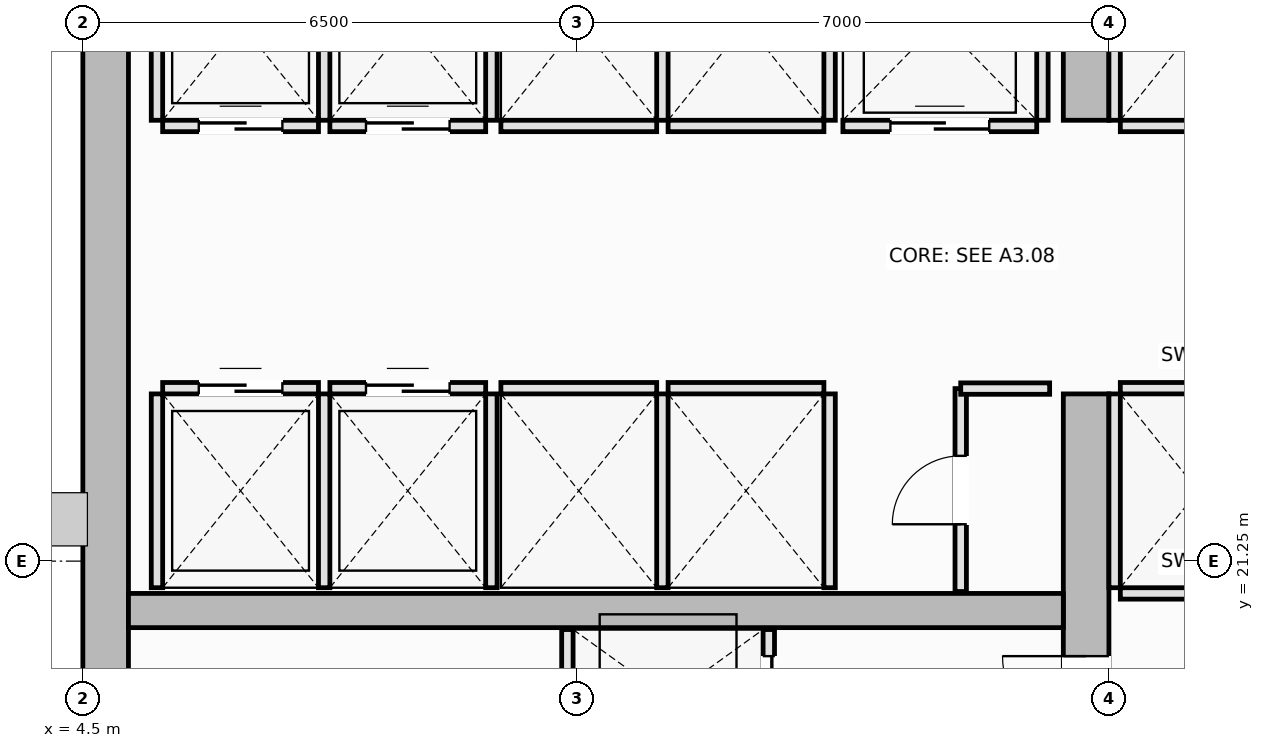
"""IFC4 building model, lengths in metres.
Left out: names, types, materials, properties, quantities, classifications, styles, units other than length and angle.
Written with IfcOpenShell. Run it as: python <this file> out.ifc"""

import sys

from ifc_helpers import new_model, si_unit, direction, frame, frame_2d, origin, place, context, subcontext, project, spatial, rectangle, extrude, element, fill, save


model = new_model("IFC4")
c1 = context("Model", 3, precision=1e-05, world=origin(), true_north=direction((0.0, 1.0)))
c2 = subcontext(c1, "Body", "Model", "MODEL_VIEW")
j1 = project(units=[si_unit("LENGTHUNIT", "METRE"), si_unit("PLANEANGLEUNIT", "RADIAN")], contexts=[c1])
p1 = place(None, origin())
s1 = spatial("IfcSite", under=j1, at=p1, CompositionType="ELEMENT")
p2 = place(p1, origin())
s2 = spatial("IfcBuilding", under=s1, at=p2, CompositionType="ELEMENT")
p3 = place(p2, frame((0.0, 0.0, 102.25)))
s3 = spatial("IfcBuildingStorey", under=s2, at=p3, CompositionType="ELEMENT", Elevation=102.25)
p4 = place(p3, frame((4.8, 14.6, 0.0), z_axis=(0.0, 0.0, 1.0), x_axis=(0.0, 1.0, 0.0)))
e1 = element("IfcWall", 1, at=p4, inside=s3, PredefinedType="SHEAR", context=c2, shape_type="SweptSolid", body=[
    extrude(rectangle(XDim=21.3, YDim=0.6, at=frame_2d((10.65, 0.0))), origin(), (0.0, 0.0, 1.0), 3.55),
])
p5 = place(p3, frame((17.7, 14.6, 0.0), z_axis=(0.0, 0.0, 1.0), x_axis=(0.0, 1.0, 0.0)))
e2 = element("IfcWall", 2, at=p5, inside=s3, PredefinedType="SHEAR", context=c2, shape_type="SweptSolid", body=[
    extrude(rectangle(XDim=8.85, YDim=0.6, at=frame_2d((4.425, 0.0))), origin(), (0.0, 0.0, 1.0), 3.55),
])
p6 = place(p5, frame((4.3, 0.0, 0.0)))
e3 = element("IfcOpeningElement", 3, at=p6, cuts=e2, PredefinedType="OPENING", context=c2, shape_type="SweptSolid", body=[
    extrude(rectangle(XDim=1.1, YDim=2.15, at=frame_2d((0.55, 1.075))), frame((0.0, 0.31, 0.0), z_axis=(0.0, -1.0, 0.0), x_axis=(1.0, 0.0, 0.0)), (0.0, 0.0, 1.0), 0.62),
])
p7 = place(p3, frame((17.7, 27.05, 0.0), z_axis=(0.0, 0.0, 1.0), x_axis=(0.0, 1.0, 0.0)))
e4 = element("IfcWall", 4, at=p7, inside=s3, PredefinedType="SHEAR", context=c2, shape_type="SweptSolid", body=[
    extrude(rectangle(XDim=8.85, YDim=0.6, at=frame_2d((4.425, 0.0))), origin(), (0.0, 0.0, 1.0), 3.55),
])
p8 = place(p7, frame((3.45, 0.0, 0.0)))
e5 = element("IfcOpeningElement", 5, at=p8, cuts=e4, PredefinedType="OPENING", context=c2, shape_type="SweptSolid", body=[
    extrude(rectangle(XDim=1.1, YDim=2.15, at=frame_2d((0.55, 1.075))), frame((0.0, 0.31, 0.0), z_axis=(0.0, -1.0, 0.0), x_axis=(1.0, 0.0, 0.0)), (0.0, 0.0, 1.0), 0.62),
])
p9 = place(p3, frame((5.1, 20.6, 0.0), z_axis=(0.0, 0.0, 1.0), x_axis=(1.0, 0.0, 0.0)))
e6 = element("IfcWall", 6, at=p9, inside=s3, PredefinedType="SHEAR", context=c2, shape_type="SweptSolid", body=[
    extrude(rectangle(XDim=12.3, YDim=0.45, at=frame_2d((6.15, 0.0))), origin(), (0.0, 0.0, 1.0), 3.55),
])
for number, where, z_axis, x_axis in (
    (7, (18.15, 20.825, 0.0), (0.0, 0.0, 1.0), (1.0, 0.0, 0.0)),
    (8, (18.15, 23.525, 0.0), (0.0, 0.0, 1.0), (1.0, 0.0, 0.0)),
):
    element("IfcWall", number, at=place(p3, frame(where, z_axis=z_axis, x_axis=x_axis)), inside=s3, PredefinedType="PARTITIONING", context=c2, shape_type="SweptSolid", body=[
        extrude(rectangle(XDim=2.05, YDim=0.15, at=frame_2d((1.025, 0.0))), origin(), (0.0, 0.0, 1.0), 3.37),
    ])
p10 = place(p3, frame((18.075, 20.9, 0.0), z_axis=(0.0, 0.0, 1.0), x_axis=(0.0, 1.0, 0.0)))
e9 = element("IfcWall", 9, at=p10, inside=s3, PredefinedType="PARTITIONING", context=c2, shape_type="SweptSolid", body=[
    extrude(rectangle(XDim=2.55, YDim=0.15, at=frame_2d((1.275, 0.0))), origin(), (0.0, 0.0, 1.0), 3.37),
])
p11 = place(p3, frame((18.15, 26.975, 0.0), z_axis=(0.0, 0.0, 1.0), x_axis=(1.0, 0.0, 0.0)))
e10 = element("IfcWall", 10, at=p11, inside=s3, PredefinedType="PARTITIONING", context=c2, shape_type="SweptSolid", body=[
    extrude(rectangle(XDim=2.05, YDim=0.15, at=frame_2d((1.025, 0.0))), origin(), (0.0, 0.0, 1.0), 3.37),
])
p12 = place(p3, frame((18.075, 27.05, 0.0), z_axis=(0.0, 0.0, 1.0), x_axis=(0.0, 1.0, 0.0)))
e11 = element("IfcWall", 11, at=p12, inside=s3, PredefinedType="PARTITIONING", context=c2, shape_type="SweptSolid", body=[
    extrude(rectangle(XDim=2.55, YDim=0.15, at=frame_2d((1.275, 0.0))), origin(), (0.0, 0.0, 1.0), 3.37),
])
p13 = place(p3, frame((5.55, 23.525, 0.0), z_axis=(0.0, 0.0, 1.0), x_axis=(1.0, 0.0, 0.0)))
e12 = element("IfcWall", 12, at=p13, inside=s3, PredefinedType="PARTITIONING", context=c2, shape_type="SweptSolid", body=[
    extrude(rectangle(XDim=2.05, YDim=0.15, at=frame_2d((1.025, 0.0))), origin(), (0.0, 0.0, 1.0), 3.37),
])
p14 = place(p13, frame((0.475, 0.0, 0.0)))
e13 = element("IfcOpeningElement", 13, at=p14, cuts=e12, PredefinedType="OPENING", context=c2, shape_type="SweptSolid", body=[
    extrude(rectangle(XDim=1.1, YDim=2.2, at=frame_2d((0.55, 1.1))), frame((0.0, 0.085, 0.0), z_axis=(0.0, -1.0, 0.0), x_axis=(1.0, 0.0, 0.0)), (0.0, 0.0, 1.0), 0.17),
])
for number, where, z_axis, x_axis in (
    (14, (5.475, 20.9, 0.0), (0.0, 0.0, 1.0), (0.0, 1.0, 0.0)),
    (15, (7.675, 20.9, 0.0), (0.0, 0.0, 1.0), (0.0, 1.0, 0.0)),
):
    element("IfcWall", number, at=place(p3, frame(where, z_axis=z_axis, x_axis=x_axis)), inside=s3, PredefinedType="PARTITIONING", context=c2, shape_type="SweptSolid", body=[
        extrude(rectangle(XDim=2.55, YDim=0.15, at=frame_2d((1.275, 0.0))), origin(), (0.0, 0.0, 1.0), 3.37),
    ])
p15 = place(p3, frame((7.75, 23.525, 0.0), z_axis=(0.0, 0.0, 1.0), x_axis=(1.0, 0.0, 0.0)))
e16 = element("IfcWall", 16, at=p15, inside=s3, PredefinedType="PARTITIONING", context=c2, shape_type="SweptSolid", body=[
    extrude(rectangle(XDim=2.05, YDim=0.15, at=frame_2d((1.025, 0.0))), origin(), (0.0, 0.0, 1.0), 3.37),
])
p16 = place(p15, frame((0.475, 0.0, 0.0)))
e17 = element("IfcOpeningElement", 17, at=p16, cuts=e16, PredefinedType="OPENING", context=c2, shape_type="SweptSolid", body=[
    extrude(rectangle(XDim=1.1, YDim=2.2, at=frame_2d((0.55, 1.1))), frame((0.0, 0.085, 0.0), z_axis=(0.0, -1.0, 0.0), x_axis=(1.0, 0.0, 0.0)), (0.0, 0.0, 1.0), 0.17),
])
p17 = place(p3, frame((9.875, 20.9, 0.0), z_axis=(0.0, 0.0, 1.0), x_axis=(0.0, 1.0, 0.0)))
e18 = element("IfcWall", 18, at=p17, inside=s3, PredefinedType="PARTITIONING", context=c2, shape_type="SweptSolid", body=[
    extrude(rectangle(XDim=2.55, YDim=0.15, at=frame_2d((1.275, 0.0))), origin(), (0.0, 0.0, 1.0), 3.37),
])
p18 = place(p3, frame((5.55, 26.975, 0.0), z_axis=(0.0, 0.0, 1.0), x_axis=(1.0, 0.0, 0.0)))
e19 = element("IfcWall", 19, at=p18, inside=s3, PredefinedType="PARTITIONING", context=c2, shape_type="SweptSolid", body=[
    extrude(rectangle(XDim=2.05, YDim=0.15, at=frame_2d((1.025, 0.0))), origin(), (0.0, 0.0, 1.0), 3.37),
])
p19 = place(p18, frame((0.475, 0.0, 0.0)))
e20 = element("IfcOpeningElement", 20, at=p19, cuts=e19, PredefinedType="OPENING", context=c2, shape_type="SweptSolid", body=[
    extrude(rectangle(XDim=1.1, YDim=2.2, at=frame_2d((0.55, 1.1))), frame((0.0, 0.085, 0.0), z_axis=(0.0, -1.0, 0.0), x_axis=(1.0, 0.0, 0.0)), (0.0, 0.0, 1.0), 0.17),
])
for number, where, z_axis, x_axis in (
    (21, (5.475, 27.05, 0.0), (0.0, 0.0, 1.0), (0.0, 1.0, 0.0)),
    (22, (7.675, 27.05, 0.0), (0.0, 0.0, 1.0), (0.0, 1.0, 0.0)),
):
    element("IfcWall", number, at=place(p3, frame(where, z_axis=z_axis, x_axis=x_axis)), inside=s3, PredefinedType="PARTITIONING", context=c2, shape_type="SweptSolid", body=[
        extrude(rectangle(XDim=2.55, YDim=0.15, at=frame_2d((1.275, 0.0))), origin(), (0.0, 0.0, 1.0), 3.37),
    ])
p20 = place(p3, frame((7.75, 26.975, 0.0), z_axis=(0.0, 0.0, 1.0), x_axis=(1.0, 0.0, 0.0)))
e23 = element("IfcWall", 23, at=p20, inside=s3, PredefinedType="PARTITIONING", context=c2, shape_type="SweptSolid", body=[
    extrude(rectangle(XDim=2.05, YDim=0.15, at=frame_2d((1.025, 0.0))), origin(), (0.0, 0.0, 1.0), 3.37),
])
p21 = place(p20, frame((0.475, 0.0, 0.0)))
e24 = element("IfcOpeningElement", 24, at=p21, cuts=e23, PredefinedType="OPENING", context=c2, shape_type="SweptSolid", body=[
    extrude(rectangle(XDim=1.1, YDim=2.2, at=frame_2d((0.55, 1.1))), frame((0.0, 0.085, 0.0), z_axis=(0.0, -1.0, 0.0), x_axis=(1.0, 0.0, 0.0)), (0.0, 0.0, 1.0), 0.17),
])
p22 = place(p3, frame((9.875, 27.05, 0.0), z_axis=(0.0, 0.0, 1.0), x_axis=(0.0, 1.0, 0.0)))
e25 = element("IfcWall", 25, at=p22, inside=s3, PredefinedType="PARTITIONING", context=c2, shape_type="SweptSolid", body=[
    extrude(rectangle(XDim=2.55, YDim=0.15, at=frame_2d((1.275, 0.0))), origin(), (0.0, 0.0, 1.0), 3.37),
])
p23 = place(p3, frame((10.0, 23.525, 0.0), z_axis=(0.0, 0.0, 1.0), x_axis=(1.0, 0.0, 0.0)))
e26 = element("IfcWall", 26, at=p23, inside=s3, PredefinedType="PARTITIONING", context=c2, shape_type="SweptSolid", body=[
    extrude(rectangle(XDim=2.05, YDim=0.15, at=frame_2d((1.025, 0.0))), origin(), (0.0, 0.0, 1.0), 3.37),
])
p24 = place(p3, frame((12.125, 20.9, 0.0), z_axis=(0.0, 0.0, 1.0), x_axis=(0.0, 1.0, 0.0)))
e27 = element("IfcWall", 27, at=p24, inside=s3, PredefinedType="PARTITIONING", context=c2, shape_type="SweptSolid", body=[
    extrude(rectangle(XDim=2.55, YDim=0.15, at=frame_2d((1.275, 0.0))), origin(), (0.0, 0.0, 1.0), 3.37),
])
p25 = place(p3, frame((12.2, 23.525, 0.0), z_axis=(0.0, 0.0, 1.0), x_axis=(1.0, 0.0, 0.0)))
e28 = element("IfcWall", 28, at=p25, inside=s3, PredefinedType="PARTITIONING", context=c2, shape_type="SweptSolid", body=[
    extrude(rectangle(XDim=2.05, YDim=0.15, at=frame_2d((1.025, 0.0))), origin(), (0.0, 0.0, 1.0), 3.37),
])
p26 = place(p3, frame((14.325, 20.9, 0.0), z_axis=(0.0, 0.0, 1.0), x_axis=(0.0, 1.0, 0.0)))
e29 = element("IfcWall", 29, at=p26, inside=s3, PredefinedType="PARTITIONING", context=c2, shape_type="SweptSolid", body=[
    extrude(rectangle(XDim=2.55, YDim=0.15, at=frame_2d((1.275, 0.0))), origin(), (0.0, 0.0, 1.0), 3.37),
])
p27 = place(p3, frame((10.0, 26.975, 0.0), z_axis=(0.0, 0.0, 1.0), x_axis=(1.0, 0.0, 0.0)))
e30 = element("IfcWall", 30, at=p27, inside=s3, PredefinedType="PARTITIONING", context=c2, shape_type="SweptSolid", body=[
    extrude(rectangle(XDim=2.05, YDim=0.15, at=frame_2d((1.025, 0.0))), origin(), (0.0, 0.0, 1.0), 3.37),
])
p28 = place(p3, frame((12.125, 27.05, 0.0), z_axis=(0.0, 0.0, 1.0), x_axis=(0.0, 1.0, 0.0)))
e31 = element("IfcWall", 31, at=p28, inside=s3, PredefinedType="PARTITIONING", context=c2, shape_type="SweptSolid", body=[
    extrude(rectangle(XDim=2.55, YDim=0.15, at=frame_2d((1.275, 0.0))), origin(), (0.0, 0.0, 1.0), 3.37),
])
p29 = place(p3, frame((12.2, 26.975, 0.0), z_axis=(0.0, 0.0, 1.0), x_axis=(1.0, 0.0, 0.0)))
e32 = element("IfcWall", 32, at=p29, inside=s3, PredefinedType="PARTITIONING", context=c2, shape_type="SweptSolid", body=[
    extrude(rectangle(XDim=2.05, YDim=0.15, at=frame_2d((1.025, 0.0))), origin(), (0.0, 0.0, 1.0), 3.37),
])
p30 = place(p3, frame((14.325, 27.05, 0.0), z_axis=(0.0, 0.0, 1.0), x_axis=(0.0, 1.0, 0.0)))
e33 = element("IfcWall", 33, at=p30, inside=s3, PredefinedType="PARTITIONING", context=c2, shape_type="SweptSolid", body=[
    extrude(rectangle(XDim=2.55, YDim=0.15, at=frame_2d((1.275, 0.0))), origin(), (0.0, 0.0, 1.0), 3.37),
])
p31 = place(p3, frame((14.5, 26.975, 0.0), z_axis=(0.0, 0.0, 1.0), x_axis=(1.0, 0.0, 0.0)))
e34 = element("IfcWall", 34, at=p31, inside=s3, PredefinedType="PARTITIONING", context=c2, shape_type="SweptSolid", body=[
    extrude(rectangle(XDim=2.55, YDim=0.15, at=frame_2d((1.275, 0.0))), origin(), (0.0, 0.0, 1.0), 3.37),
])
p32 = place(p31, frame((0.625, 0.0, 0.0)))
e35 = element("IfcOpeningElement", 35, at=p32, cuts=e34, PredefinedType="OPENING", context=c2, shape_type="SweptSolid", body=[
    extrude(rectangle(XDim=1.3, YDim=2.2, at=frame_2d((0.65, 1.1))), frame((0.0, 0.085, 0.0), z_axis=(0.0, -1.0, 0.0), x_axis=(1.0, 0.0, 0.0)), (0.0, 0.0, 1.0), 0.17),
])
p33 = place(p3, frame((17.125, 27.05, 0.0), z_axis=(0.0, 0.0, 1.0), x_axis=(0.0, 1.0, 0.0)))
e36 = element("IfcWall", 36, at=p33, inside=s3, PredefinedType="PARTITIONING", context=c2, shape_type="SweptSolid", body=[
    extrude(rectangle(XDim=2.6, YDim=0.15, at=frame_2d((1.3, 0.0))), origin(), (0.0, 0.0, 1.0), 3.37),
])
p34 = place(p3, frame((10.875, 18.55, 0.0), z_axis=(0.0, 0.0, 1.0), x_axis=(0.0, 1.0, 0.0)))
e37 = element("IfcWall", 37, at=p34, inside=s3, PredefinedType="PARTITIONING", context=c2, shape_type="SweptSolid", body=[
    extrude(rectangle(XDim=1.8, YDim=0.15, at=frame_2d((0.9, 0.0))), origin(), (0.0, 0.0, 1.0), 3.37),
])
p35 = place(p3, frame((13.525, 18.55, 0.0), z_axis=(0.0, 0.0, 1.0), x_axis=(0.0, 1.0, 0.0)))
e38 = element("IfcWall", 38, at=p35, inside=s3, PredefinedType="PARTITIONING", context=c2, shape_type="SweptSolid", body=[
    extrude(rectangle(XDim=1.8, YDim=0.15, at=frame_2d((0.9, 0.0))), origin(), (0.0, 0.0, 1.0), 3.37),
])
p36 = place(p35, frame((0.35, 0.0, 0.0)))
e39 = element("IfcOpeningElement", 39, at=p36, cuts=e38, PredefinedType="OPENING", context=c2, shape_type="SweptSolid", body=[
    extrude(rectangle(XDim=1.1, YDim=2.2, at=frame_2d((0.55, 1.1))), frame((0.0, 0.085, 0.0), z_axis=(0.0, -1.0, 0.0), x_axis=(1.0, 0.0, 0.0)), (0.0, 0.0, 1.0), 0.17),
])
p37 = place(p3, frame((16.05, 20.85, 0.0), z_axis=(0.0, 0.0, 1.0), x_axis=(0.0, 1.0, 0.0)))
e40 = element("IfcWall", 40, at=p37, inside=s3, PredefinedType="PARTITIONING", context=c2, shape_type="SweptSolid", body=[
    extrude(rectangle(XDim=2.67, YDim=0.15, at=frame_2d((1.335, 0.0))), origin(), (0.0, 0.0, 1.0), 3.37),
])
p38 = place(p37, frame((0.885, 0.0, 0.0)))
e41 = element("IfcOpeningElement", 41, at=p38, cuts=e40, PredefinedType="OPENING", context=c2, shape_type="SweptSolid", body=[
    extrude(rectangle(XDim=0.9, YDim=2.1, at=frame_2d((0.45, 1.05))), frame((0.0, 0.085, 0.0), z_axis=(0.0, -1.0, 0.0), x_axis=(1.0, 0.0, 0.0)), (0.0, 0.0, 1.0), 0.17),
])
p39 = place(p3, frame((16.05, 23.52, 0.0), z_axis=(0.0, 0.0, 1.0), x_axis=(1.0, 0.0, 0.0)))
e42 = element("IfcWall", 42, at=p39, inside=s3, PredefinedType="PARTITIONING", context=c2, shape_type="SweptSolid", body=[
    extrude(rectangle(XDim=1.17, YDim=0.15, at=frame_2d((0.585, 0.0))), origin(), (0.0, 0.0, 1.0), 3.37),
])
p40 = place(p14, origin())
e43 = element("IfcDoor", 43, at=p40, inside=s3, OperationType="DOUBLE_DOOR_SLIDING", PredefinedType="DOOR", context=c2, shape_type="SweptSolid", body=[
    extrude(rectangle(XDim=1.1, YDim=2.2, at=frame_2d((0.55, 1.1))), frame((0.0, 0.025, 0.0), z_axis=(0.0, -1.0, 0.0), x_axis=(1.0, 0.0, 0.0)), (0.0, 0.0, 1.0), 0.05),
])
fill(e13, e43)
p41 = place(p16, origin())
e44 = element("IfcDoor", 44, at=p41, inside=s3, OperationType="DOUBLE_DOOR_SLIDING", PredefinedType="DOOR", context=c2, shape_type="SweptSolid", body=[
    extrude(rectangle(XDim=1.1, YDim=2.2, at=frame_2d((0.55, 1.1))), frame((0.0, 0.025, 0.0), z_axis=(0.0, -1.0, 0.0), x_axis=(1.0, 0.0, 0.0)), (0.0, 0.0, 1.0), 0.05),
])
fill(e17, e44)
p42 = place(p19, origin())
e45 = element("IfcDoor", 45, at=p42, inside=s3, OperationType="DOUBLE_DOOR_SLIDING", PredefinedType="DOOR", context=c2, shape_type="SweptSolid", body=[
    extrude(rectangle(XDim=1.1, YDim=2.2, at=frame_2d((0.55, 1.1))), frame((0.0, 0.025, 0.0), z_axis=(0.0, -1.0, 0.0), x_axis=(1.0, 0.0, 0.0)), (0.0, 0.0, 1.0), 0.05),
])
fill(e20, e45)
p43 = place(p21, origin())
e46 = element("IfcDoor", 46, at=p43, inside=s3, OperationType="DOUBLE_DOOR_SLIDING", PredefinedType="DOOR", context=c2, shape_type="SweptSolid", body=[
    extrude(rectangle(XDim=1.1, YDim=2.2, at=frame_2d((0.55, 1.1))), frame((0.0, 0.025, 0.0), z_axis=(0.0, -1.0, 0.0), x_axis=(1.0, 0.0, 0.0)), (0.0, 0.0, 1.0), 0.05),
])
fill(e24, e46)
p44 = place(p32, origin())
e47 = element("IfcDoor", 47, at=p44, inside=s3, OperationType="DOUBLE_DOOR_SLIDING", PredefinedType="DOOR", context=c2, shape_type="SweptSolid", body=[
    extrude(rectangle(XDim=1.3, YDim=2.2, at=frame_2d((0.65, 1.1))), frame((0.0, 0.025, 0.0), z_axis=(0.0, -1.0, 0.0), x_axis=(1.0, 0.0, 0.0)), (0.0, 0.0, 1.0), 0.05),
])
fill(e35, e47)
p45 = place(p36, origin())
e48 = element("IfcDoor", 48, at=p45, inside=s3, OperationType="DOUBLE_DOOR_SLIDING", PredefinedType="DOOR", context=c2, shape_type="SweptSolid", body=[
    extrude(rectangle(XDim=1.1, YDim=2.2, at=frame_2d((0.55, 1.1))), frame((0.0, 0.025, 0.0), z_axis=(0.0, -1.0, 0.0), x_axis=(1.0, 0.0, 0.0)), (0.0, 0.0, 1.0), 0.05),
])
fill(e39, e48)
p46 = place(p6, origin())
e49 = element("IfcDoor", 49, at=p46, inside=s3, OperationType="SINGLE_SWING_RIGHT", PredefinedType="DOOR", context=c2, shape_type="SweptSolid", body=[
    extrude(rectangle(XDim=1.1, YDim=2.15, at=frame_2d((0.55, 1.075))), frame((0.0, 0.025, 0.0), z_axis=(0.0, -1.0, 0.0), x_axis=(1.0, 0.0, 0.0)), (0.0, 0.0, 1.0), 0.05),
])
fill(e3, e49)
p47 = place(p38, origin())
e50 = element("IfcDoor", 50, at=p47, inside=s3, OperationType="SINGLE_SWING_LEFT", PredefinedType="DOOR", context=c2, shape_type="SweptSolid", body=[
    extrude(rectangle(XDim=0.9, YDim=2.1, at=frame_2d((0.45, 1.05))), frame((0.0, 0.025, 0.0), z_axis=(0.0, -1.0, 0.0), x_axis=(1.0, 0.0, 0.0)), (0.0, 0.0, 1.0), 0.05),
])
fill(e41, e50)
save(model, sys.argv[1])
